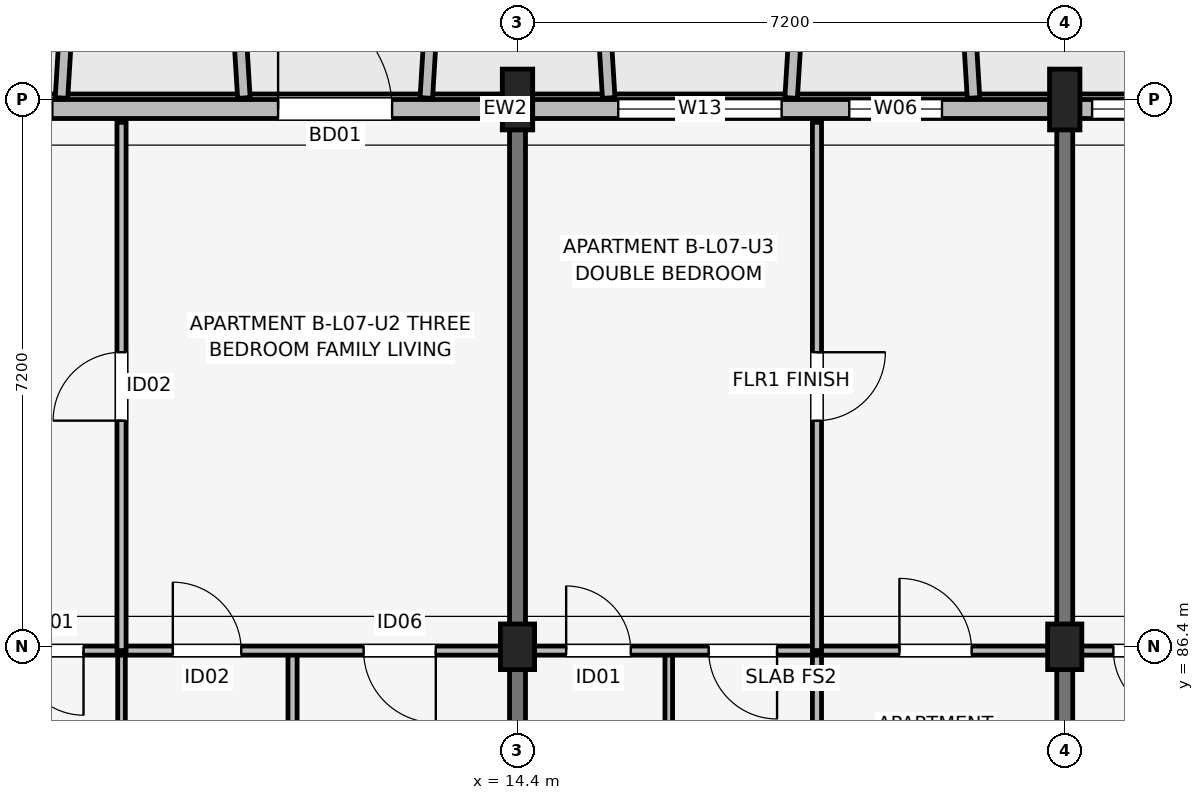
"""IFC4 building model, lengths in metres.
Left out: names, types, materials, properties, quantities, classifications, styles, units other than length and angle.
Written with IfcOpenShell. Run it as: python <this file> out.ifc"""

import sys

from ifc_helpers import new_model, si_unit, direction, frame, frame_2d, origin, origin_2d, place, context, subcontext, project, spatial, rectangle, extrude, element, fill, save


model = new_model("IFC4")
c1 = context("Model", 3, precision=1e-05, world=origin(), true_north=direction((0.0, 1.0)))
c2 = subcontext(c1, "Body", "Model", "MODEL_VIEW")
j1 = project(units=[si_unit("LENGTHUNIT", "METRE"), si_unit("PLANEANGLEUNIT", "RADIAN")], contexts=[c1])
p1 = place(None, origin())
s1 = spatial("IfcSite", under=j1, at=p1, CompositionType="ELEMENT")
p2 = place(p1, origin())
s2 = spatial("IfcBuilding", under=s1, at=p2, CompositionType="ELEMENT")
p3 = place(p2, frame((0.0, 0.0, 24.45)))
s3 = spatial("IfcBuildingStorey", under=s2, at=p3, CompositionType="ELEMENT", Elevation=24.45)
p4 = place(p3, frame((14.4, 86.4, 0.0), z_axis=(0.0, 0.0, 1.0), x_axis=(1.0, 0.0, 0.0)))
e1 = element("IfcColumn", 1, at=p4, inside=s3, PredefinedType="COLUMN", context=c2, shape_type="SweptSolid", body=[
    extrude(rectangle(XDim=0.45, YDim=0.6, at=origin_2d()), origin(), (0.0, 0.0, 1.0), 3.15),
])
p5 = place(p3, frame((14.4, 93.6, 0.0), z_axis=(0.0, 0.0, 1.0), x_axis=(1.0, 0.0, 0.0)))
e2 = element("IfcColumn", 2, at=p5, inside=s3, PredefinedType="COLUMN", context=c2, shape_type="SweptSolid", body=[
    extrude(rectangle(XDim=0.4, YDim=0.8, at=origin_2d()), origin(), (0.0, 0.0, 1.0), 3.15),
])
p6 = place(p3, frame((21.6, 86.4, 0.0), z_axis=(0.0, 0.0, 1.0), x_axis=(1.0, 0.0, 0.0)))
e3 = element("IfcColumn", 3, at=p6, inside=s3, PredefinedType="COLUMN", context=c2, shape_type="SweptSolid", body=[
    extrude(rectangle(XDim=0.45, YDim=0.6, at=origin_2d()), origin(), (0.0, 0.0, 1.0), 3.15),
])
p7 = place(p3, frame((21.6, 93.6, 0.0), z_axis=(0.0, 0.0, 1.0), x_axis=(1.0, 0.0, 0.0)))
e4 = element("IfcColumn", 4, at=p7, inside=s3, PredefinedType="COLUMN", context=c2, shape_type="SweptSolid", body=[
    extrude(rectangle(XDim=0.4, YDim=0.8, at=origin_2d()), origin(), (0.0, 0.0, 1.0), 3.15),
])
for number, where, z_axis, x_axis in (
    (5, (14.4, 83.85, 0.0), (0.0, 0.0, 1.0), (0.0, 1.0, 0.0)),
    (6, (21.6, 83.85, 0.0), (0.0, 0.0, 1.0), (0.0, 1.0, 0.0)),
):
    element("IfcWall", number, at=place(p3, frame(where, z_axis=z_axis, x_axis=x_axis)), inside=s3, PredefinedType="SHEAR", context=c2, shape_type="SweptSolid", body=[
        extrude(rectangle(XDim=9.4, YDim=0.21, at=frame_2d((4.7, 0.0))), origin(), (0.0, 0.0, 1.0), 3.15),
    ])
p8 = place(p3, frame((32.8, 93.475, 0.0), z_axis=(0.0, 0.0, 1.0), x_axis=(-1.0, 0.0, 0.0)))
e7 = element("IfcWall", 7, at=p8, inside=s3, PredefinedType="SOLIDWALL", context=c2, shape_type="SweptSolid", body=[
    extrude(rectangle(XDim=29.6, YDim=0.25, at=frame_2d((14.8, 0.0))), origin(), (0.0, 0.0, 1.0), 2.43),
])
p9 = place(p8, frame((21.55, 0.0, 0.0), z_axis=(0.0, 0.0, 1.0), x_axis=(-1.0, 0.0, 0.0)))
e8 = element("IfcOpeningElement", 8, at=p9, cuts=e7, PredefinedType="OPENING", context=c2, shape_type="SweptSolid", body=[
    extrude(rectangle(XDim=1.5, YDim=2.15, at=frame_2d((0.75, 1.075))), frame((0.0, 0.135, 0.0), z_axis=(0.0, -1.0, 0.0), x_axis=(1.0, 0.0, 0.0)), (0.0, 0.0, 1.0), 0.27),
])
p10 = place(p8, frame((7.3, 0.0, 0.0), z_axis=(0.0, 0.0, 1.0), x_axis=(-1.0, 0.0, 0.0)))
e9 = element("IfcOpeningElement", 9, at=p10, cuts=e7, PredefinedType="OPENING", context=c2, shape_type="SweptSolid", body=[
    extrude(rectangle(XDim=1.8, YDim=2.15, at=frame_2d((0.9, 1.075))), frame((0.0, 0.135, 0.0), z_axis=(0.0, -1.0, 0.0), x_axis=(1.0, 0.0, 0.0)), (0.0, 0.0, 1.0), 0.27),
])
p11 = place(p8, frame((27.57, 0.0, 0.7)))
e10 = element("IfcOpeningElement", 10, at=p11, cuts=e7, PredefinedType="OPENING", context=c2, shape_type="SweptSolid", body=[
    extrude(rectangle(XDim=1.46, YDim=1.55, at=frame_2d((0.73, 0.775))), frame((0.0, 0.135, 0.0), z_axis=(0.0, -1.0, 0.0), x_axis=(1.0, 0.0, 0.0)), (0.0, 0.0, 1.0), 0.27),
])
p12 = place(p8, frame((26.02, 0.0, 0.75)))
e11 = element("IfcOpeningElement", 11, at=p12, cuts=e7, PredefinedType="OPENING", context=c2, shape_type="SweptSolid", body=[
    extrude(rectangle(XDim=0.6, YDim=1.25, at=frame_2d((0.3, 0.625))), frame((0.0, 0.135, 0.0), z_axis=(0.0, -1.0, 0.0), x_axis=(1.0, 0.0, 0.0)), (0.0, 0.0, 1.0), 0.27),
])
p13 = place(p8, frame((24.52, 0.0, 0.75)))
e12 = element("IfcOpeningElement", 12, at=p13, cuts=e7, PredefinedType="OPENING", context=c2, shape_type="SweptSolid", body=[
    extrude(rectangle(XDim=0.72, YDim=1.35, at=frame_2d((0.36, 0.675))), frame((0.0, 0.135, 0.0), z_axis=(0.0, -1.0, 0.0), x_axis=(1.0, 0.0, 0.0)), (0.0, 0.0, 1.0), 0.27),
])
p14 = place(p8, frame((14.925, 0.0, 0.67)))
e13 = element("IfcOpeningElement", 13, at=p14, cuts=e7, PredefinedType="OPENING", context=c2, shape_type="SweptSolid", body=[
    extrude(rectangle(XDim=2.15, YDim=1.65, at=frame_2d((1.075, 0.825))), frame((0.0, 0.135, 0.0), z_axis=(0.0, -1.0, 0.0), x_axis=(1.0, 0.0, 0.0)), (0.0, 0.0, 1.0), 0.27),
])
p15 = place(p8, frame((12.815, 0.0, 0.75)))
e14 = element("IfcOpeningElement", 14, at=p15, cuts=e7, PredefinedType="OPENING", context=c2, shape_type="SweptSolid", body=[
    extrude(rectangle(XDim=1.22, YDim=1.5, at=frame_2d((0.61, 0.75))), frame((0.0, 0.135, 0.0), z_axis=(0.0, -1.0, 0.0), x_axis=(1.0, 0.0, 0.0)), (0.0, 0.0, 1.0), 0.27),
])
p16 = place(p8, frame((10.12, 0.0, 0.75)))
e15 = element("IfcOpeningElement", 15, at=p16, cuts=e7, PredefinedType="OPENING", context=c2, shape_type="SweptSolid", body=[
    extrude(rectangle(XDim=0.72, YDim=1.35, at=frame_2d((0.36, 0.675))), frame((0.0, 0.135, 0.0), z_axis=(0.0, -1.0, 0.0), x_axis=(1.0, 0.0, 0.0)), (0.0, 0.0, 1.0), 0.27),
])
p17 = place(p8, frame((2.92, 0.0, 0.75)))
e16 = element("IfcOpeningElement", 16, at=p17, cuts=e7, PredefinedType="OPENING", context=c2, shape_type="SweptSolid", body=[
    extrude(rectangle(XDim=0.72, YDim=1.35, at=frame_2d((0.36, 0.675))), frame((0.0, 0.135, 0.0), z_axis=(0.0, -1.0, 0.0), x_axis=(1.0, 0.0, 0.0)), (0.0, 0.0, 1.0), 0.27),
])
p18 = place(p8, frame((0.87, 0.0, 0.75)))
e17 = element("IfcOpeningElement", 17, at=p18, cuts=e7, PredefinedType="OPENING", context=c2, shape_type="SweptSolid", body=[
    extrude(rectangle(XDim=0.6, YDim=1.25, at=frame_2d((0.3, 0.625))), frame((0.0, 0.135, 0.0), z_axis=(0.0, -1.0, 0.0), x_axis=(1.0, 0.0, 0.0)), (0.0, 0.0, 1.0), 0.27),
])
for number, where, z_axis, x_axis in (
    (18, (8.4, 93.62, 0.0), (0.0, 0.0, 1.0), (0.061, 0.998, 0.0)),
    (19, (10.8, 93.62, 0.0), (0.0, 0.0, 1.0), (-0.061, 0.998, 0.0)),
    (20, (13.2, 93.62, 0.0), (0.0, 0.0, 1.0), (0.061, 0.998, 0.0)),
):
    element("IfcWall", number, at=place(p3, frame(where, z_axis=z_axis, x_axis=x_axis)), inside=s3, PredefinedType="ELEMENTEDWALL", context=c2, shape_type="SweptSolid", body=[
        extrude(rectangle(XDim=1.964, YDim=0.165, at=frame_2d((0.982, 0.0))), origin(), (0.0, 0.0, 1.0), 2.53),
    ])
for number, where, z_axis, x_axis in (
    (21, (15.6, 93.62, 0.0), (0.0, 0.0, 1.0), (-0.061, 0.998, 0.0)),
    (22, (18.0, 93.62, 0.0), (0.0, 0.0, 1.0), (0.061, 0.998, 0.0)),
    (23, (20.4, 93.62, 0.0), (0.0, 0.0, 1.0), (-0.061, 0.998, 0.0)),
):
    element("IfcWall", number, at=place(p3, frame(where, z_axis=z_axis, x_axis=x_axis)), inside=s3, PredefinedType="ELEMENTEDWALL", context=c2, shape_type="SweptSolid", body=[
        extrude(rectangle(XDim=1.964, YDim=0.165, at=frame_2d((0.982, 0.0))), origin(), (0.0, 0.0, 1.0), 2.55),
    ])
p19 = place(p3, frame((9.19, 83.7, 0.0), z_axis=(0.0, 0.0, 1.0), x_axis=(0.0, 1.0, 0.0)))
e24 = element("IfcWall", 24, at=p19, inside=s3, PredefinedType="PARTITIONING", context=c2, shape_type="SweptSolid", body=[
    extrude(rectangle(XDim=2.65, YDim=0.1, at=frame_2d((1.325, 0.0))), origin(), (0.0, 0.0, 1.0), 2.38),
])
p20 = place(p3, frame((11.44, 83.7, 0.0), z_axis=(0.0, 0.0, 1.0), x_axis=(0.0, 1.0, 0.0)))
e25 = element("IfcWall", 25, at=p20, inside=s3, PredefinedType="PARTITIONING", context=c2, shape_type="SweptSolid", body=[
    extrude(rectangle(XDim=2.65, YDim=0.12, at=frame_2d((1.325, 0.0))), origin(), (0.0, 0.0, 1.0), 2.38),
])
p21 = place(p3, frame((7.34, 86.35, 0.0), z_axis=(0.0, 0.0, 1.0), x_axis=(1.0, 0.0, 0.0)))
e26 = element("IfcWall", 26, at=p21, inside=s3, PredefinedType="PARTITIONING", context=c2, shape_type="SweptSolid", body=[
    extrude(rectangle(XDim=6.92, YDim=0.12, at=frame_2d((3.46, 0.0))), origin(), (0.0, 0.0, 1.0), 2.38),
])
p22 = place(p21, frame((1.35, 0.0, 0.0), z_axis=(0.0, 0.0, 1.0), x_axis=(-1.0, 0.0, 0.0)))
e27 = element("IfcOpeningElement", 27, at=p22, cuts=e26, PredefinedType="OPENING", context=c2, shape_type="SweptSolid", body=[
    extrude(rectangle(XDim=0.85, YDim=2.08, at=frame_2d((0.425, 1.04))), frame((0.0, 0.07, 0.0), z_axis=(0.0, -1.0, 0.0), x_axis=(1.0, 0.0, 0.0)), (0.0, 0.0, 1.0), 0.14),
])
p23 = place(p21, frame((2.525, 0.0, 0.0)))
e28 = element("IfcOpeningElement", 28, at=p23, cuts=e26, PredefinedType="OPENING", context=c2, shape_type="SweptSolid", body=[
    extrude(rectangle(XDim=0.9, YDim=2.08, at=frame_2d((0.45, 1.04))), frame((0.0, 0.07, 0.0), z_axis=(0.0, -1.0, 0.0), x_axis=(1.0, 0.0, 0.0)), (0.0, 0.0, 1.0), 0.14),
])
p24 = place(p21, frame((5.985, 0.0, 0.0), z_axis=(0.0, 0.0, 1.0), x_axis=(-1.0, 0.0, 0.0)))
e29 = element("IfcOpeningElement", 29, at=p24, cuts=e26, PredefinedType="OPENING", context=c2, shape_type="SweptSolid", body=[
    extrude(rectangle(XDim=0.95, YDim=2.08, at=frame_2d((0.475, 1.04))), frame((0.0, 0.07, 0.0), z_axis=(0.0, -1.0, 0.0), x_axis=(1.0, 0.0, 0.0)), (0.0, 0.0, 1.0), 0.14),
])
p25 = place(p3, frame((9.19, 86.35, 0.0), z_axis=(0.0, 0.0, 1.0), x_axis=(0.0, 1.0, 0.0)))
e30 = element("IfcWall", 30, at=p25, inside=s3, PredefinedType="PARTITIONING", context=c2, shape_type="SweptSolid", body=[
    extrude(rectangle(XDim=6.95, YDim=0.12, at=frame_2d((3.475, 0.0))), origin(), (0.0, 0.0, 1.0), 2.38),
])
p26 = place(p25, frame((3.025, 0.0, 0.0)))
e31 = element("IfcOpeningElement", 31, at=p26, cuts=e30, PredefinedType="OPENING", context=c2, shape_type="SweptSolid", body=[
    extrude(rectangle(XDim=0.9, YDim=2.08, at=frame_2d((0.45, 1.04))), frame((0.0, 0.07, 0.0), z_axis=(0.0, -1.0, 0.0), x_axis=(1.0, 0.0, 0.0)), (0.0, 0.0, 1.0), 0.14),
])
p27 = place(p3, frame((16.39, 83.7, 0.0), z_axis=(0.0, 0.0, 1.0), x_axis=(0.0, 1.0, 0.0)))
e32 = element("IfcWall", 32, at=p27, inside=s3, PredefinedType="PARTITIONING", context=c2, shape_type="SweptSolid", body=[
    extrude(rectangle(XDim=2.65, YDim=0.1, at=frame_2d((1.325, 0.0))), origin(), (0.0, 0.0, 1.0), 2.38),
])
p28 = place(p3, frame((18.34, 83.7, 0.0), z_axis=(0.0, 0.0, 1.0), x_axis=(0.0, 1.0, 0.0)))
e33 = element("IfcWall", 33, at=p28, inside=s3, PredefinedType="PARTITIONING", context=c2, shape_type="SweptSolid", body=[
    extrude(rectangle(XDim=2.65, YDim=0.12, at=frame_2d((1.325, 0.0))), origin(), (0.0, 0.0, 1.0), 2.38),
])
p29 = place(p3, frame((14.54, 86.35, 0.0), z_axis=(0.0, 0.0, 1.0), x_axis=(1.0, 0.0, 0.0)))
e34 = element("IfcWall", 34, at=p29, inside=s3, PredefinedType="PARTITIONING", context=c2, shape_type="SweptSolid", body=[
    extrude(rectangle(XDim=6.92, YDim=0.12, at=frame_2d((3.46, 0.0))), origin(), (0.0, 0.0, 1.0), 2.38),
])
p30 = place(p29, frame((0.5, 0.0, 0.0)))
e35 = element("IfcOpeningElement", 35, at=p30, cuts=e34, PredefinedType="OPENING", context=c2, shape_type="SweptSolid", body=[
    extrude(rectangle(XDim=0.85, YDim=2.08, at=frame_2d((0.425, 1.04))), frame((0.0, 0.07, 0.0), z_axis=(0.0, -1.0, 0.0), x_axis=(1.0, 0.0, 0.0)), (0.0, 0.0, 1.0), 0.14),
])
p31 = place(p29, frame((3.275, 0.0, 0.0), z_axis=(0.0, 0.0, 1.0), x_axis=(-1.0, 0.0, 0.0)))
e36 = element("IfcOpeningElement", 36, at=p31, cuts=e34, PredefinedType="OPENING", context=c2, shape_type="SweptSolid", body=[
    extrude(rectangle(XDim=0.9, YDim=2.08, at=frame_2d((0.45, 1.04))), frame((0.0, 0.07, 0.0), z_axis=(0.0, -1.0, 0.0), x_axis=(1.0, 0.0, 0.0)), (0.0, 0.0, 1.0), 0.14),
])
p32 = place(p29, frame((4.885, 0.0, 0.0)))
e37 = element("IfcOpeningElement", 37, at=p32, cuts=e34, PredefinedType="OPENING", context=c2, shape_type="SweptSolid", body=[
    extrude(rectangle(XDim=0.95, YDim=2.08, at=frame_2d((0.475, 1.04))), frame((0.0, 0.07, 0.0), z_axis=(0.0, -1.0, 0.0), x_axis=(1.0, 0.0, 0.0)), (0.0, 0.0, 1.0), 0.14),
])
p33 = place(p3, frame((18.34, 86.35, 0.0), z_axis=(0.0, 0.0, 1.0), x_axis=(0.0, 1.0, 0.0)))
e38 = element("IfcWall", 38, at=p33, inside=s3, PredefinedType="PARTITIONING", context=c2, shape_type="SweptSolid", body=[
    extrude(rectangle(XDim=6.95, YDim=0.12, at=frame_2d((3.475, 0.0))), origin(), (0.0, 0.0, 1.0), 2.38),
])
p34 = place(p33, frame((3.925, 0.0, 0.0), z_axis=(0.0, 0.0, 1.0), x_axis=(-1.0, 0.0, 0.0)))
e39 = element("IfcOpeningElement", 39, at=p34, cuts=e38, PredefinedType="OPENING", context=c2, shape_type="SweptSolid", body=[
    extrude(rectangle(XDim=0.9, YDim=2.08, at=frame_2d((0.45, 1.04))), frame((0.0, 0.07, 0.0), z_axis=(0.0, -1.0, 0.0), x_axis=(1.0, 0.0, 0.0)), (0.0, 0.0, 1.0), 0.14),
])
p35 = place(p3, frame((21.74, 86.35, 0.0), z_axis=(0.0, 0.0, 1.0), x_axis=(1.0, 0.0, 0.0)))
e40 = element("IfcWall", 40, at=p35, inside=s3, PredefinedType="PARTITIONING", context=c2, shape_type="SweptSolid", body=[
    extrude(rectangle(XDim=6.92, YDim=0.12, at=frame_2d((3.46, 0.0))), origin(), (0.0, 0.0, 1.0), 2.38),
])
p36 = place(p35, frame((1.35, 0.0, 0.0), z_axis=(0.0, 0.0, 1.0), x_axis=(-1.0, 0.0, 0.0)))
e41 = element("IfcOpeningElement", 41, at=p36, cuts=e40, PredefinedType="OPENING", context=c2, shape_type="SweptSolid", body=[
    extrude(rectangle(XDim=0.85, YDim=2.08, at=frame_2d((0.425, 1.04))), frame((0.0, 0.07, 0.0), z_axis=(0.0, -1.0, 0.0), x_axis=(1.0, 0.0, 0.0)), (0.0, 0.0, 1.0), 0.14),
])
p37 = place(p35, frame((2.525, 0.0, 0.0)))
e42 = element("IfcOpeningElement", 42, at=p37, cuts=e40, PredefinedType="OPENING", context=c2, shape_type="SweptSolid", body=[
    extrude(rectangle(XDim=0.9, YDim=2.08, at=frame_2d((0.45, 1.04))), frame((0.0, 0.07, 0.0), z_axis=(0.0, -1.0, 0.0), x_axis=(1.0, 0.0, 0.0)), (0.0, 0.0, 1.0), 0.14),
])
p38 = place(p35, frame((5.985, 0.0, 0.0), z_axis=(0.0, 0.0, 1.0), x_axis=(-1.0, 0.0, 0.0)))
e43 = element("IfcOpeningElement", 43, at=p38, cuts=e40, PredefinedType="OPENING", context=c2, shape_type="SweptSolid", body=[
    extrude(rectangle(XDim=0.95, YDim=2.08, at=frame_2d((0.475, 1.04))), frame((0.0, 0.07, 0.0), z_axis=(0.0, -1.0, 0.0), x_axis=(1.0, 0.0, 0.0)), (0.0, 0.0, 1.0), 0.14),
])
p39 = place(p9, origin())
e44 = element("IfcDoor", 44, at=p39, inside=s3, OperationType="SINGLE_SWING_RIGHT", PredefinedType="DOOR", context=c2, shape_type="SweptSolid", body=[
    extrude(rectangle(XDim=1.5, YDim=2.15, at=frame_2d((0.75, 1.075))), frame((0.0, 0.025, 0.0), z_axis=(0.0, -1.0, 0.0), x_axis=(1.0, 0.0, 0.0)), (0.0, 0.0, 1.0), 0.05),
])
fill(e8, e44)
p40 = place(p13, origin())
e45 = element("IfcWindow", 45, at=p40, inside=s3, PartitioningType="SINGLE_PANEL", PredefinedType="WINDOW", context=c2, shape_type="SweptSolid", body=[
    extrude(rectangle(XDim=0.72, YDim=1.35, at=frame_2d((0.36, 0.675))), frame((0.0, 0.03, 0.0), z_axis=(0.0, -1.0, 0.0), x_axis=(1.0, 0.0, 0.0)), (0.0, 0.0, 1.0), 0.06),
])
fill(e12, e45)
p41 = place(p14, origin())
e46 = element("IfcWindow", 46, at=p41, inside=s3, PartitioningType="SINGLE_PANEL", PredefinedType="WINDOW", context=c2, shape_type="SweptSolid", body=[
    extrude(rectangle(XDim=2.15, YDim=1.65, at=frame_2d((1.075, 0.825))), frame((0.0, 0.03, 0.0), z_axis=(0.0, -1.0, 0.0), x_axis=(1.0, 0.0, 0.0)), (0.0, 0.0, 1.0), 0.06),
])
fill(e13, e46)
p42 = place(p15, origin())
e47 = element("IfcWindow", 47, at=p42, inside=s3, PartitioningType="SINGLE_PANEL", PredefinedType="WINDOW", context=c2, shape_type="SweptSolid", body=[
    extrude(rectangle(XDim=1.22, YDim=1.5, at=frame_2d((0.61, 0.75))), frame((0.0, 0.03, 0.0), z_axis=(0.0, -1.0, 0.0), x_axis=(1.0, 0.0, 0.0)), (0.0, 0.0, 1.0), 0.06),
])
fill(e14, e47)
p43 = place(p16, origin())
e48 = element("IfcWindow", 48, at=p43, inside=s3, PartitioningType="SINGLE_PANEL", PredefinedType="WINDOW", context=c2, shape_type="SweptSolid", body=[
    extrude(rectangle(XDim=0.72, YDim=1.35, at=frame_2d((0.36, 0.675))), frame((0.0, 0.03, 0.0), z_axis=(0.0, -1.0, 0.0), x_axis=(1.0, 0.0, 0.0)), (0.0, 0.0, 1.0), 0.06),
])
fill(e15, e48)
p44 = place(p22, origin())
e49 = element("IfcDoor", 49, at=p44, inside=s3, OperationType="SINGLE_SWING_RIGHT", PredefinedType="DOOR", context=c2, shape_type="SweptSolid", body=[
    extrude(rectangle(XDim=0.85, YDim=2.08, at=frame_2d((0.425, 1.04))), frame((0.0, 0.025, 0.0), z_axis=(0.0, -1.0, 0.0), x_axis=(1.0, 0.0, 0.0)), (0.0, 0.0, 1.0), 0.05),
])
fill(e27, e49)
p45 = place(p23, origin())
e50 = element("IfcDoor", 50, at=p45, inside=s3, OperationType="SINGLE_SWING_LEFT", PredefinedType="DOOR", context=c2, shape_type="SweptSolid", body=[
    extrude(rectangle(XDim=0.9, YDim=2.08, at=frame_2d((0.45, 1.04))), frame((0.0, 0.025, 0.0), z_axis=(0.0, -1.0, 0.0), x_axis=(1.0, 0.0, 0.0)), (0.0, 0.0, 1.0), 0.05),
])
fill(e28, e50)
p46 = place(p24, origin())
e51 = element("IfcDoor", 51, at=p46, inside=s3, OperationType="SINGLE_SWING_RIGHT", PredefinedType="DOOR", context=c2, shape_type="SweptSolid", body=[
    extrude(rectangle(XDim=0.95, YDim=2.08, at=frame_2d((0.475, 1.04))), frame((0.0, 0.025, 0.0), z_axis=(0.0, -1.0, 0.0), x_axis=(1.0, 0.0, 0.0)), (0.0, 0.0, 1.0), 0.05),
])
fill(e29, e51)
p47 = place(p26, origin())
e52 = element("IfcDoor", 52, at=p47, inside=s3, OperationType="SINGLE_SWING_LEFT", PredefinedType="DOOR", context=c2, shape_type="SweptSolid", body=[
    extrude(rectangle(XDim=0.9, YDim=2.08, at=frame_2d((0.45, 1.04))), frame((0.0, 0.025, 0.0), z_axis=(0.0, -1.0, 0.0), x_axis=(1.0, 0.0, 0.0)), (0.0, 0.0, 1.0), 0.05),
])
fill(e31, e52)
p48 = place(p30, origin())
e53 = element("IfcDoor", 53, at=p48, inside=s3, OperationType="SINGLE_SWING_LEFT", PredefinedType="DOOR", context=c2, shape_type="SweptSolid", body=[
    extrude(rectangle(XDim=0.85, YDim=2.08, at=frame_2d((0.425, 1.04))), frame((0.0, 0.025, 0.0), z_axis=(0.0, -1.0, 0.0), x_axis=(1.0, 0.0, 0.0)), (0.0, 0.0, 1.0), 0.05),
])
fill(e35, e53)
p49 = place(p31, origin())
e54 = element("IfcDoor", 54, at=p49, inside=s3, OperationType="SINGLE_SWING_RIGHT", PredefinedType="DOOR", context=c2, shape_type="SweptSolid", body=[
    extrude(rectangle(XDim=0.9, YDim=2.08, at=frame_2d((0.45, 1.04))), frame((0.0, 0.025, 0.0), z_axis=(0.0, -1.0, 0.0), x_axis=(1.0, 0.0, 0.0)), (0.0, 0.0, 1.0), 0.05),
])
fill(e36, e54)
p50 = place(p32, origin())
e55 = element("IfcDoor", 55, at=p50, inside=s3, OperationType="SINGLE_SWING_LEFT", PredefinedType="DOOR", context=c2, shape_type="SweptSolid", body=[
    extrude(rectangle(XDim=0.95, YDim=2.08, at=frame_2d((0.475, 1.04))), frame((0.0, 0.025, 0.0), z_axis=(0.0, -1.0, 0.0), x_axis=(1.0, 0.0, 0.0)), (0.0, 0.0, 1.0), 0.05),
])
fill(e37, e55)
p51 = place(p34, origin())
e56 = element("IfcDoor", 56, at=p51, inside=s3, OperationType="SINGLE_SWING_RIGHT", PredefinedType="DOOR", context=c2, shape_type="SweptSolid", body=[
    extrude(rectangle(XDim=0.9, YDim=2.08, at=frame_2d((0.45, 1.04))), frame((0.0, 0.025, 0.0), z_axis=(0.0, -1.0, 0.0), x_axis=(1.0, 0.0, 0.0)), (0.0, 0.0, 1.0), 0.05),
])
fill(e39, e56)
p52 = place(p36, origin())
e57 = element("IfcDoor", 57, at=p52, inside=s3, OperationType="SINGLE_SWING_RIGHT", PredefinedType="DOOR", context=c2, shape_type="SweptSolid", body=[
    extrude(rectangle(XDim=0.85, YDim=2.08, at=frame_2d((0.425, 1.04))), frame((0.0, 0.025, 0.0), z_axis=(0.0, -1.0, 0.0), x_axis=(1.0, 0.0, 0.0)), (0.0, 0.0, 1.0), 0.05),
])
fill(e41, e57)
save(model, sys.argv[1])
